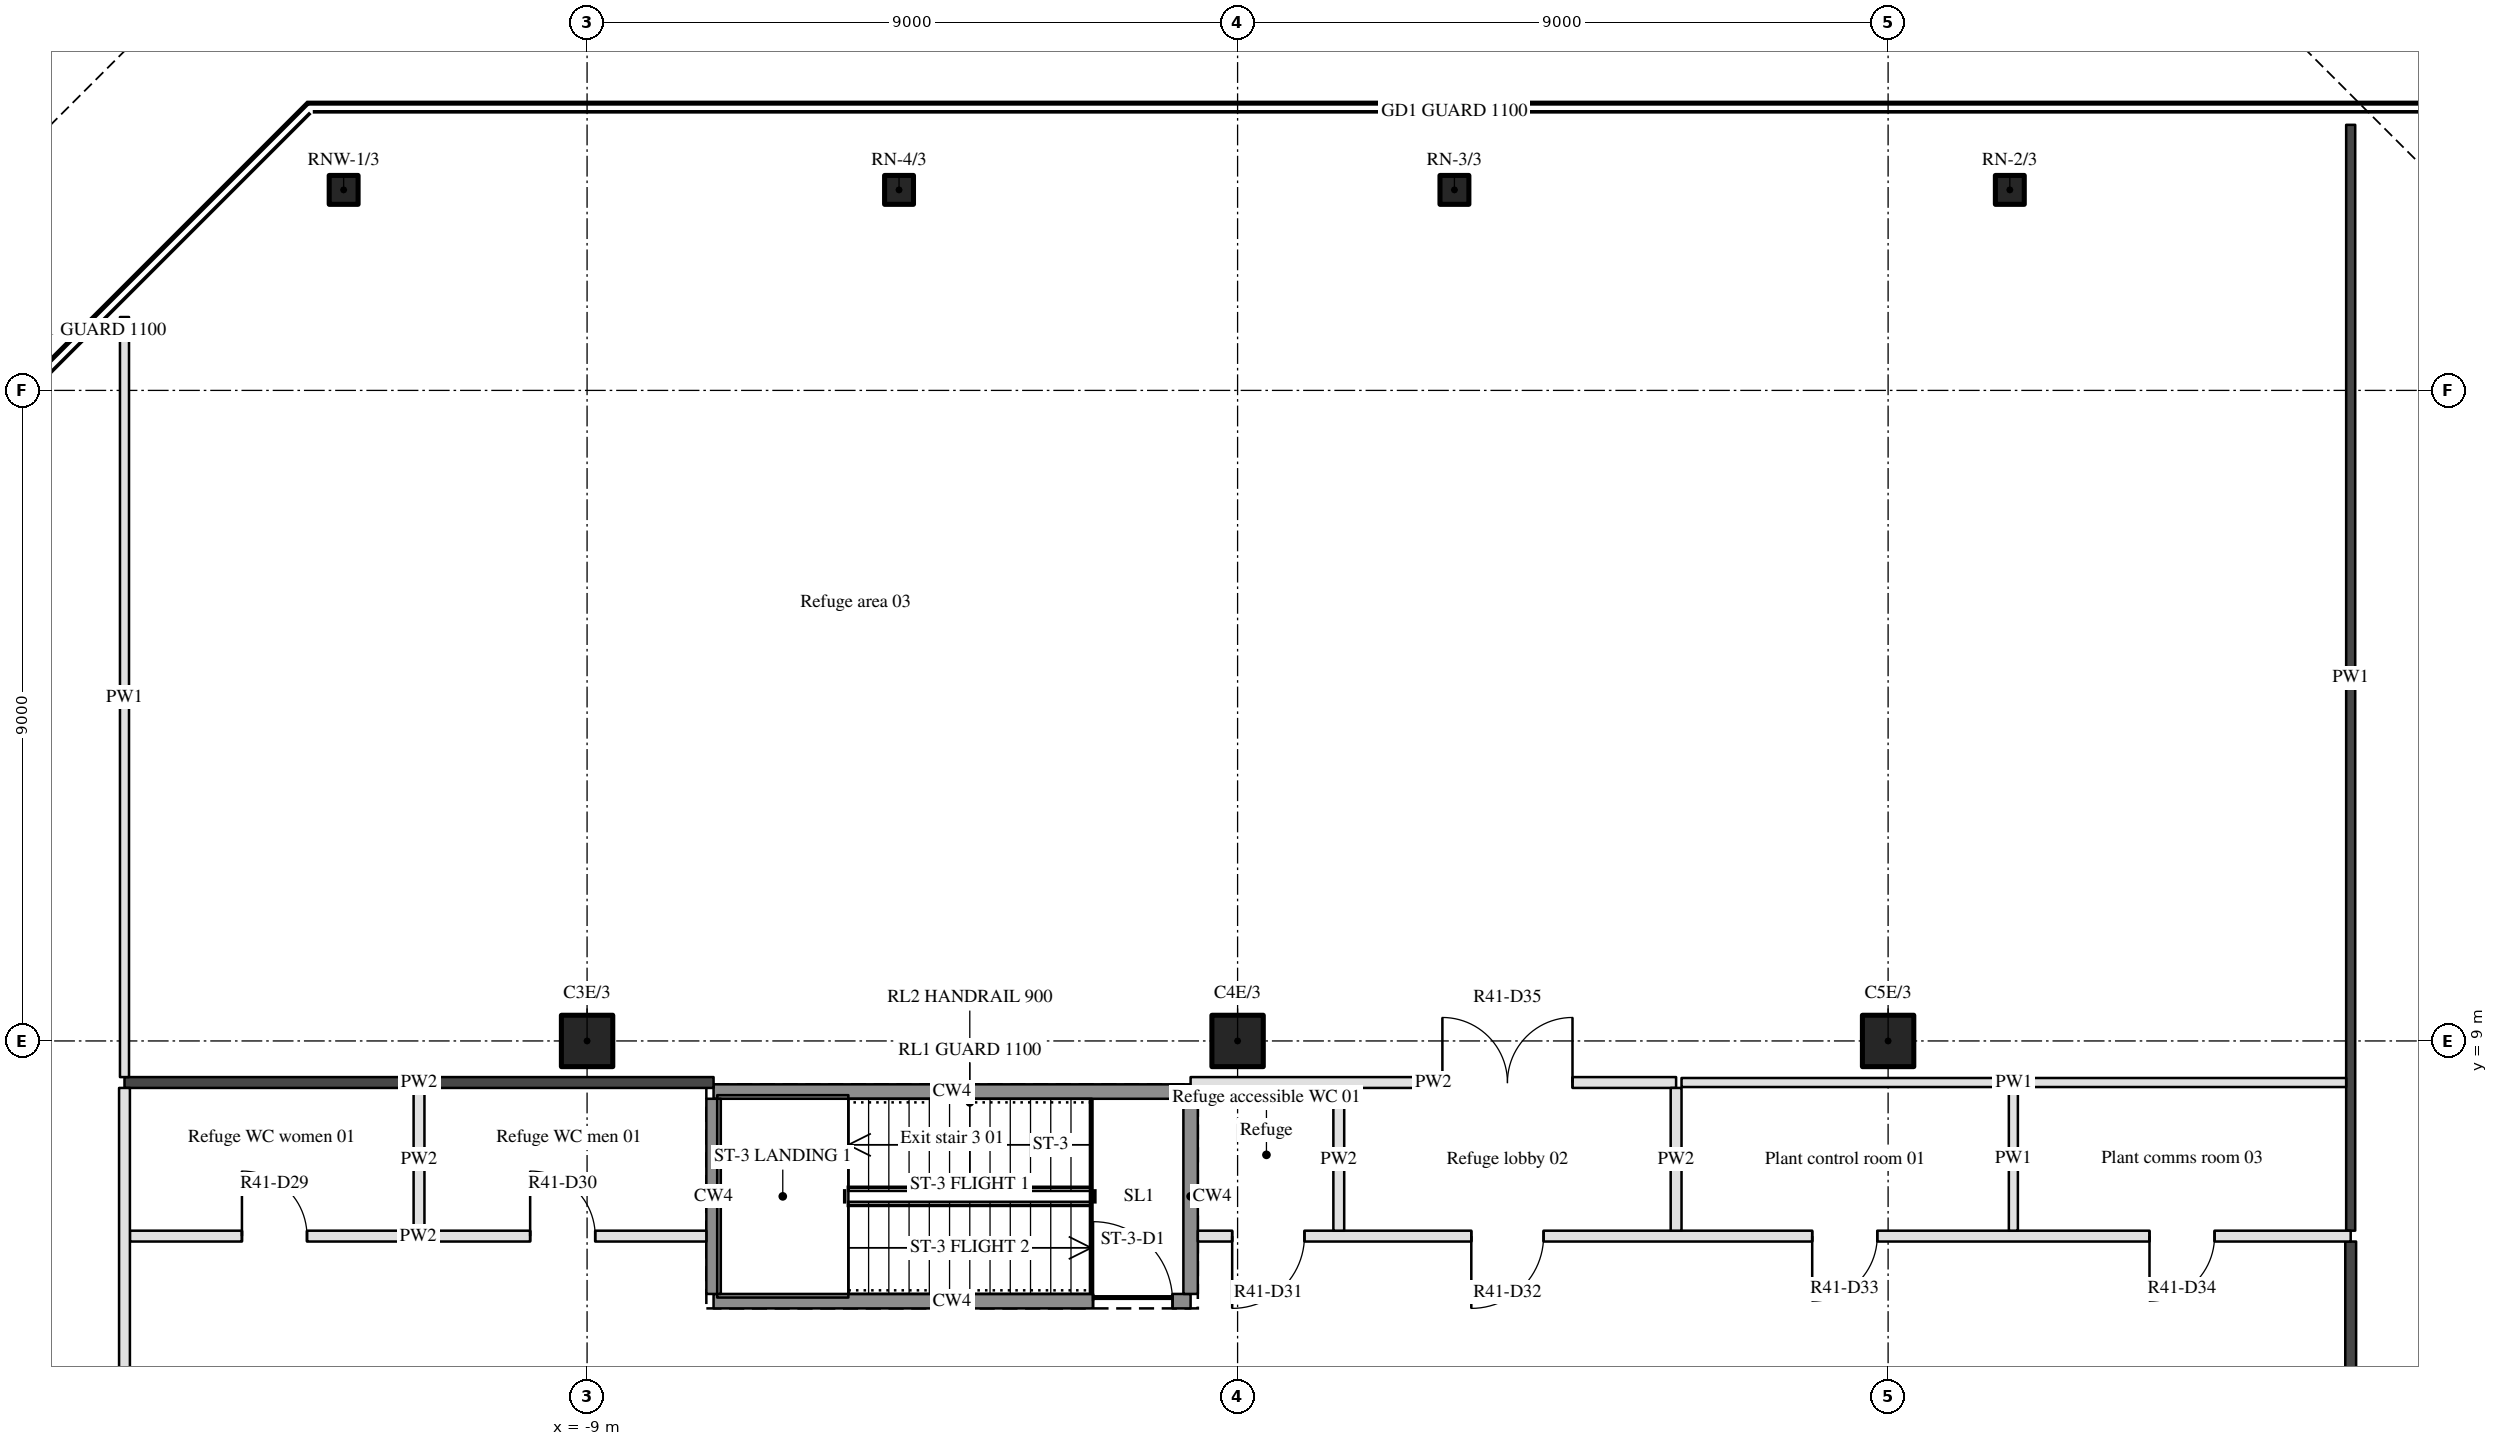
"""IFC4 building model, lengths in metres.
Left out: names, types, materials, properties, quantities, classifications, styles, units other than length and angle.
Written with IfcOpenShell. Run it as: python <this file> out.ifc"""

import sys

from ifc_helpers import new_model, si_unit, direction, frame, frame_2d, origin, origin_2d, place, context, subcontext, project, spatial, rectangle, hollow_rectangle, hollow_circle, extrude, element, fill, save


model = new_model("IFC4")
c1 = context("Model", 3, precision=1e-05, world=origin(), true_north=direction((0.0, 1.0)))
c2 = subcontext(c1, "Body", "Model", "MODEL_VIEW")
j1 = project(units=[si_unit("LENGTHUNIT", "METRE"), si_unit("PLANEANGLEUNIT", "RADIAN")], contexts=[c1])
p1 = place(None, origin())
s1 = spatial("IfcSite", under=j1, at=p1, CompositionType="ELEMENT")
p2 = place(p1, origin())
s2 = spatial("IfcBuilding", under=s1, at=p2, CompositionType="ELEMENT")
p3 = place(p2, frame((0.0, 0.0, 167.7)))
s3 = spatial("IfcBuildingStorey", under=s2, at=p3, CompositionType="ELEMENT", Elevation=167.7)
for number, where, z_axis, x_axis in (
    (1, (-9.0, 9.0, 0.0), (0.0, 0.0, 1.0), (1.0, 0.0, 0.0)),
    (2, (0.0, 9.0, 0.0), (0.0, 0.0, 1.0), (1.0, 0.0, 0.0)),
    (3, (9.0, 9.0, 0.0), (0.0, 0.0, 1.0), (1.0, 0.0, 0.0)),
):
    element("IfcColumn", number, at=place(p3, frame(where, z_axis=z_axis, x_axis=x_axis)), inside=s3, PredefinedType="COLUMN", context=c2, shape_type="SweptSolid", body=[
        extrude(hollow_circle(Radius=0.355, WallThickness=0.032, at=origin_2d()), origin(), (0.0, 0.0, 1.0), 4.5),
    ])
for number, where, z_axis, x_axis in (
    (4, (10.684, 20.774, 0.0), (0.0, 0.0, 1.0), (1.0, 0.0, 0.0)),
    (5, (3.0, 20.774, 0.0), (0.0, 0.0, 1.0), (1.0, 0.0, 0.0)),
    (6, (-4.684, 20.774, 0.0), (0.0, 0.0, 1.0), (1.0, 0.0, 0.0)),
    (7, (-12.368, 20.774, 0.0), (0.0, 0.0, 1.0), (1.0, 0.0, 0.0)),
):
    element("IfcColumn", number, at=place(p3, frame(where, z_axis=z_axis, x_axis=x_axis)), inside=s3, PredefinedType="COLUMN", context=c2, shape_type="SweptSolid", body=[
        extrude(hollow_rectangle(XDim=0.4, YDim=0.4, WallThickness=0.02, InnerFilletRadius=0.03, OuterFilletRadius=0.05, at=origin_2d()), origin(), (0.0, 0.0, 1.0), 4.08),
    ])
p4 = place(p3, frame((-7.25, 5.4, 0.0), z_axis=(0.0, 0.0, 1.0), x_axis=(1.0, 0.0, 0.0)))
e8 = element("IfcWall", 8, at=p4, inside=s3, PredefinedType="SHEAR", context=c2, shape_type="SweptSolid", body=[
    extrude(rectangle(XDim=6.6, YDim=0.2, at=frame_2d((3.3, 0.0))), origin(), (0.0, 0.0, 1.0), 4.5),
])
p5 = place(p4, frame((5.25, 0.0, 0.0)))
e9 = element("IfcOpeningElement", 9, at=p5, cuts=e8, PredefinedType="OPENING", context=c2, shape_type="SweptSolid", body=[
    extrude(rectangle(XDim=1.1, YDim=2.1, at=frame_2d((0.55, 1.05))), frame((0.0, 0.11, 0.0), z_axis=(0.0, -1.0, 0.0), x_axis=(1.0, 0.0, 0.0)), (0.0, 0.0, 1.0), 0.22),
])
p6 = place(p3, frame((-15.325, 6.3, 0.0), z_axis=(0.0, 0.0, 1.0), x_axis=(1.0, 0.0, 0.0)))
e10 = element("IfcWall", 10, at=p6, inside=s3, PredefinedType="PARTITIONING", context=c2, shape_type="SweptSolid", body=[
    extrude(rectangle(XDim=7.975, YDim=0.15, at=frame_2d((3.987, 0.0))), origin(), (0.0, 0.0, 1.0), 3.56),
])
p7 = place(p6, frame((1.55, 0.0, 0.0)))
e11 = element("IfcOpeningElement", 11, at=p7, cuts=e10, PredefinedType="OPENING", context=c2, shape_type="SweptSolid", body=[
    extrude(rectangle(XDim=0.9, YDim=2.1, at=frame_2d((0.45, 1.05))), frame((0.0, 0.085, 0.0), z_axis=(0.0, -1.0, 0.0), x_axis=(1.0, 0.0, 0.0)), (0.0, 0.0, 1.0), 0.17),
])
p8 = place(p6, frame((5.538, 0.0, 0.0)))
e12 = element("IfcOpeningElement", 12, at=p8, cuts=e10, PredefinedType="OPENING", context=c2, shape_type="SweptSolid", body=[
    extrude(rectangle(XDim=0.9, YDim=2.1, at=frame_2d((0.45, 1.05))), frame((0.0, 0.085, 0.0), z_axis=(0.0, -1.0, 0.0), x_axis=(1.0, 0.0, 0.0)), (0.0, 0.0, 1.0), 0.17),
])
p9 = place(p3, frame((15.4, 6.3, 0.0), z_axis=(0.0, 0.0, 1.0), x_axis=(-1.0, 0.0, 0.0)))
e13 = element("IfcWall", 13, at=p9, inside=s3, PredefinedType="PARTITIONING", context=c2, shape_type="SweptSolid", body=[
    extrude(rectangle(XDim=15.95, YDim=0.15, at=frame_2d((7.975, 0.0))), origin(), (0.0, 0.0, 1.0), 3.56),
])
p10 = place(p9, frame((11.167, 0.0, 0.0)))
e14 = element("IfcOpeningElement", 14, at=p10, cuts=e13, PredefinedType="OPENING", context=c2, shape_type="SweptSolid", body=[
    extrude(rectangle(XDim=1.0, YDim=2.1, at=frame_2d((0.5, 1.05))), frame((0.0, 0.085, 0.0), z_axis=(0.0, -1.0, 0.0), x_axis=(1.0, 0.0, 0.0)), (0.0, 0.0, 1.0), 0.17),
])
p11 = place(p9, frame((14.475, 0.0, 0.0)))
e15 = element("IfcOpeningElement", 15, at=p11, cuts=e13, PredefinedType="OPENING", context=c2, shape_type="SweptSolid", body=[
    extrude(rectangle(XDim=1.0, YDim=2.1, at=frame_2d((0.5, 1.05))), frame((0.0, 0.085, 0.0), z_axis=(0.0, -1.0, 0.0), x_axis=(1.0, 0.0, 0.0)), (0.0, 0.0, 1.0), 0.17),
])
p12 = place(p9, frame((6.55, 0.0, 0.0)))
e16 = element("IfcOpeningElement", 16, at=p12, cuts=e13, PredefinedType="OPENING", context=c2, shape_type="SweptSolid", body=[
    extrude(rectangle(XDim=0.9, YDim=2.1, at=frame_2d((0.45, 1.05))), frame((0.0, 0.085, 0.0), z_axis=(0.0, -1.0, 0.0), x_axis=(1.0, 0.0, 0.0)), (0.0, 0.0, 1.0), 0.17),
])
p13 = place(p9, frame((1.884, 0.0, 0.0)))
e17 = element("IfcOpeningElement", 17, at=p13, cuts=e13, PredefinedType="OPENING", context=c2, shape_type="SweptSolid", body=[
    extrude(rectangle(XDim=0.9, YDim=2.1, at=frame_2d((0.45, 1.05))), frame((0.0, 0.085, 0.0), z_axis=(0.0, -1.0, 0.0), x_axis=(1.0, 0.0, 0.0)), (0.0, 0.0, 1.0), 0.17),
])
p14 = place(p3, frame((-7.25, 8.3, 0.0), z_axis=(0.0, 0.0, 1.0), x_axis=(1.0, 0.0, 0.0)))
e18 = element("IfcWall", 18, at=p14, inside=s3, PredefinedType="SHEAR", context=c2, shape_type="SweptSolid", body=[
    extrude(rectangle(XDim=6.6, YDim=0.2, at=frame_2d((3.3, 0.0))), origin(), (0.0, 0.0, 1.0), 4.5),
])
p15 = place(p3, frame((-15.4, 8.425, 0.0), z_axis=(0.0, 0.0, 1.0), x_axis=(1.0, 0.0, 0.0)))
e19 = element("IfcWall", 19, at=p15, inside=s3, PredefinedType="PARTITIONING", context=c2, shape_type="SweptSolid", body=[
    extrude(rectangle(XDim=8.15, YDim=0.15, at=frame_2d((4.075, 0.0))), origin(), (0.0, 0.0, 1.0), 3.08),
])
p16 = place(p3, frame((-0.65, 8.425, 0.0), z_axis=(0.0, 0.0, 1.0), x_axis=(1.0, 0.0, 0.0)))
e20 = element("IfcWall", 20, at=p16, inside=s3, PredefinedType="PARTITIONING", context=c2, shape_type="SweptSolid", body=[
    extrude(rectangle(XDim=6.717, YDim=0.15, at=frame_2d((3.358, 0.0))), origin(), (0.0, 0.0, 1.0), 3.56),
])
p17 = place(p16, frame((3.483, 0.0, 0.0)))
e21 = element("IfcOpeningElement", 21, at=p17, cuts=e20, PredefinedType="OPENING", context=c2, shape_type="SweptSolid", body=[
    extrude(rectangle(XDim=1.8, YDim=2.1, at=frame_2d((0.9, 1.05))), frame((0.0, 0.085, 0.0), z_axis=(0.0, -1.0, 0.0), x_axis=(1.0, 0.0, 0.0)), (0.0, 0.0, 1.0), 0.17),
])
p18 = place(p3, frame((6.142, 8.425, 0.0), z_axis=(0.0, 0.0, 1.0), x_axis=(1.0, 0.0, 0.0)))
e22 = element("IfcWall", 22, at=p18, inside=s3, PredefinedType="PARTITIONING", context=c2, shape_type="SweptSolid", body=[
    extrude(rectangle(XDim=9.195, YDim=0.125, at=frame_2d((4.598, 0.0))), origin(), (0.0, 0.0, 1.0), 3.56),
])
p19 = place(p3, frame((-15.4, 8.35, 0.0), z_axis=(0.0, 0.0, 1.0), x_axis=(0.0, -1.0, 0.0)))
e23 = element("IfcWall", 23, at=p19, inside=s3, PredefinedType="PARTITIONING", context=c2, shape_type="SweptSolid", body=[
    extrude(rectangle(XDim=23.175, YDim=0.15, at=frame_2d((11.587, 0.0))), origin(), (0.0, 0.0, 1.0), 3.56),
])
p20 = place(p19, frame((11.712, 0.0, 0.0)))
e24 = element("IfcOpeningElement", 24, at=p20, cuts=e23, PredefinedType="OPENING", context=c2, shape_type="SweptSolid", body=[
    extrude(rectangle(XDim=1.8, YDim=2.1, at=frame_2d((0.9, 1.05))), frame((0.0, 0.085, 0.0), z_axis=(0.0, -1.0, 0.0), x_axis=(1.0, 0.0, 0.0)), (0.0, 0.0, 1.0), 0.17),
])
p21 = place(p19, frame((7.325, 0.0, 0.0)))
e25 = element("IfcOpeningElement", 25, at=p21, cuts=e23, PredefinedType="OPENING", context=c2, shape_type="SweptSolid", body=[
    extrude(rectangle(XDim=1.8, YDim=2.1, at=frame_2d((0.9, 1.05))), frame((0.0, 0.085, 0.0), z_axis=(0.0, -1.0, 0.0), x_axis=(1.0, 0.0, 0.0)), (0.0, 0.0, 1.0), 0.17),
])
p22 = place(p3, frame((-15.4, 8.5, 0.0), z_axis=(0.0, 0.0, 1.0), x_axis=(0.0, 1.0, 0.0)))
e26 = element("IfcWall", 26, at=p22, inside=s3, PredefinedType="PARTITIONING", context=c2, shape_type="SweptSolid", body=[
    extrude(rectangle(XDim=10.515, YDim=0.125, at=frame_2d((5.257, 0.0))), origin(), (0.0, 0.0, 1.0), 3.56),
])
p23 = place(p3, frame((-11.325, 6.375, 0.0), z_axis=(0.0, 0.0, 1.0), x_axis=(0.0, 1.0, 0.0)))
e27 = element("IfcWall", 27, at=p23, inside=s3, PredefinedType="PARTITIONING", context=c2, shape_type="SweptSolid", body=[
    extrude(rectangle(XDim=1.975, YDim=0.15, at=frame_2d((0.988, 0.0))), origin(), (0.0, 0.0, 1.0), 3.56),
])
for number, where, z_axis, x_axis in (
    (28, (-7.25, 5.5, 0.0), (0.0, 0.0, 1.0), (0.0, 1.0, 0.0)),
    (29, (-0.65, 5.5, 0.0), (0.0, 0.0, 1.0), (0.0, 1.0, 0.0)),
):
    element("IfcWall", number, at=place(p3, frame(where, z_axis=z_axis, x_axis=x_axis)), inside=s3, PredefinedType="SHEAR", context=c2, shape_type="SweptSolid", body=[
        extrude(rectangle(XDim=2.7, YDim=0.2, at=frame_2d((1.35, 0.0))), origin(), (0.0, 0.0, 1.0), 4.5),
    ])
for number, where, z_axis, x_axis in (
    (30, (1.4, 6.375, 0.0), (0.0, 0.0, 1.0), (0.0, 1.0, 0.0)),
    (31, (6.067, 6.375, 0.0), (0.0, 0.0, 1.0), (0.0, 1.0, 0.0)),
):
    element("IfcWall", number, at=place(p3, frame(where, z_axis=z_axis, x_axis=x_axis)), inside=s3, PredefinedType="PARTITIONING", context=c2, shape_type="SweptSolid", body=[
        extrude(rectangle(XDim=1.975, YDim=0.15, at=frame_2d((0.988, 0.0))), origin(), (0.0, 0.0, 1.0), 3.56),
    ])
p24 = place(p3, frame((10.733, 6.375, 0.0), z_axis=(0.0, 0.0, 1.0), x_axis=(0.0, 1.0, 0.0)))
e32 = element("IfcWall", 32, at=p24, inside=s3, PredefinedType="PARTITIONING", context=c2, shape_type="SweptSolid", body=[
    extrude(rectangle(XDim=1.988, YDim=0.125, at=frame_2d((0.994, 0.0))), origin(), (0.0, 0.0, 1.0), 3.56),
])
p25 = place(p3, frame((15.4, -14.825, 0.0), z_axis=(0.0, 0.0, 1.0), x_axis=(0.0, 1.0, 0.0)))
e33 = element("IfcWall", 33, at=p25, inside=s3, PredefinedType="PARTITIONING", context=c2, shape_type="SweptSolid", body=[
    extrude(rectangle(XDim=21.05, YDim=0.15, at=frame_2d((10.525, 0.0))), origin(), (0.0, 0.0, 1.0), 3.08),
])
p26 = place(p25, frame((9.625, 0.0, 0.0)))
e34 = element("IfcOpeningElement", 34, at=p26, cuts=e33, PredefinedType="OPENING", context=c2, shape_type="SweptSolid", body=[
    extrude(rectangle(XDim=1.8, YDim=2.1, at=frame_2d((0.9, 1.05))), frame((0.0, 0.085, 0.0), z_axis=(0.0, -1.0, 0.0), x_axis=(1.0, 0.0, 0.0)), (0.0, 0.0, 1.0), 0.17),
])
p27 = place(p25, frame((13.65, 0.0, 0.0)))
e35 = element("IfcOpeningElement", 35, at=p27, cuts=e33, PredefinedType="OPENING", context=c2, shape_type="SweptSolid", body=[
    extrude(rectangle(XDim=1.8, YDim=2.1, at=frame_2d((0.9, 1.05))), frame((0.0, 0.085, 0.0), z_axis=(0.0, -1.0, 0.0), x_axis=(1.0, 0.0, 0.0)), (0.0, 0.0, 1.0), 0.17),
])
p28 = place(p3, frame((15.4, 6.375, 0.0), z_axis=(0.0, 0.0, 1.0), x_axis=(0.0, 1.0, 0.0)))
e36 = element("IfcWall", 36, at=p28, inside=s3, PredefinedType="PARTITIONING", context=c2, shape_type="SweptSolid", body=[
    extrude(rectangle(XDim=15.299, YDim=0.125, at=frame_2d((7.649, 0.0))), origin(), (0.0, 0.0, 1.0), 3.08),
])
p29 = place(p10, origin())
e37 = element("IfcDoor", 37, at=p29, inside=s3, OperationType="SINGLE_SWING_RIGHT", PredefinedType="DOOR", context=c2, shape_type="SweptSolid", body=[
    extrude(rectangle(XDim=1.0, YDim=2.1, at=frame_2d((0.5, 1.05))), frame((0.0, 0.025, 0.0), z_axis=(0.0, -1.0, 0.0), x_axis=(1.0, 0.0, 0.0)), (0.0, 0.0, 1.0), 0.05),
])
fill(e14, e37)
p30 = place(p17, origin())
e38 = element("IfcDoor", 38, at=p30, inside=s3, OperationType="DOUBLE_DOOR_SINGLE_SWING", PredefinedType="DOOR", context=c2, shape_type="SweptSolid", body=[
    extrude(rectangle(XDim=1.8, YDim=2.1, at=frame_2d((0.9, 1.05))), frame((0.0, 0.025, 0.0), z_axis=(0.0, -1.0, 0.0), x_axis=(1.0, 0.0, 0.0)), (0.0, 0.0, 1.0), 0.05),
])
fill(e21, e38)
p31 = place(p5, origin())
e39 = element("IfcDoor", 39, at=p31, inside=s3, OperationType="SINGLE_SWING_LEFT", PredefinedType="DOOR", context=c2, shape_type="SweptSolid", body=[
    extrude(rectangle(XDim=1.1, YDim=2.1, at=frame_2d((0.55, 1.05))), frame((0.0, 0.025, 0.0), z_axis=(0.0, -1.0, 0.0), x_axis=(1.0, 0.0, 0.0)), (0.0, 0.0, 1.0), 0.05),
])
fill(e9, e39)
p32 = place(p7, origin())
e40 = element("IfcDoor", 40, at=p32, inside=s3, OperationType="SINGLE_SWING_LEFT", PredefinedType="DOOR", context=c2, shape_type="SweptSolid", body=[
    extrude(rectangle(XDim=0.9, YDim=2.1, at=frame_2d((0.45, 1.05))), frame((0.0, 0.025, 0.0), z_axis=(0.0, -1.0, 0.0), x_axis=(1.0, 0.0, 0.0)), (0.0, 0.0, 1.0), 0.05),
])
fill(e11, e40)
p33 = place(p8, origin())
e41 = element("IfcDoor", 41, at=p33, inside=s3, OperationType="SINGLE_SWING_LEFT", PredefinedType="DOOR", context=c2, shape_type="SweptSolid", body=[
    extrude(rectangle(XDim=0.9, YDim=2.1, at=frame_2d((0.45, 1.05))), frame((0.0, 0.025, 0.0), z_axis=(0.0, -1.0, 0.0), x_axis=(1.0, 0.0, 0.0)), (0.0, 0.0, 1.0), 0.05),
])
fill(e12, e41)
p34 = place(p11, origin())
e42 = element("IfcDoor", 42, at=p34, inside=s3, OperationType="SINGLE_SWING_RIGHT", PredefinedType="DOOR", context=c2, shape_type="SweptSolid", body=[
    extrude(rectangle(XDim=1.0, YDim=2.1, at=frame_2d((0.5, 1.05))), frame((0.0, 0.025, 0.0), z_axis=(0.0, -1.0, 0.0), x_axis=(1.0, 0.0, 0.0)), (0.0, 0.0, 1.0), 0.05),
])
fill(e15, e42)
p35 = place(p12, origin())
e43 = element("IfcDoor", 43, at=p35, inside=s3, OperationType="SINGLE_SWING_RIGHT", PredefinedType="DOOR", context=c2, shape_type="SweptSolid", body=[
    extrude(rectangle(XDim=0.9, YDim=2.1, at=frame_2d((0.45, 1.05))), frame((0.0, 0.025, 0.0), z_axis=(0.0, -1.0, 0.0), x_axis=(1.0, 0.0, 0.0)), (0.0, 0.0, 1.0), 0.05),
])
fill(e16, e43)
p36 = place(p13, origin())
e44 = element("IfcDoor", 44, at=p36, inside=s3, OperationType="SINGLE_SWING_RIGHT", PredefinedType="DOOR", context=c2, shape_type="SweptSolid", body=[
    extrude(rectangle(XDim=0.9, YDim=2.1, at=frame_2d((0.45, 1.05))), frame((0.0, 0.025, 0.0), z_axis=(0.0, -1.0, 0.0), x_axis=(1.0, 0.0, 0.0)), (0.0, 0.0, 1.0), 0.05),
])
fill(e17, e44)
save(model, sys.argv[1])
